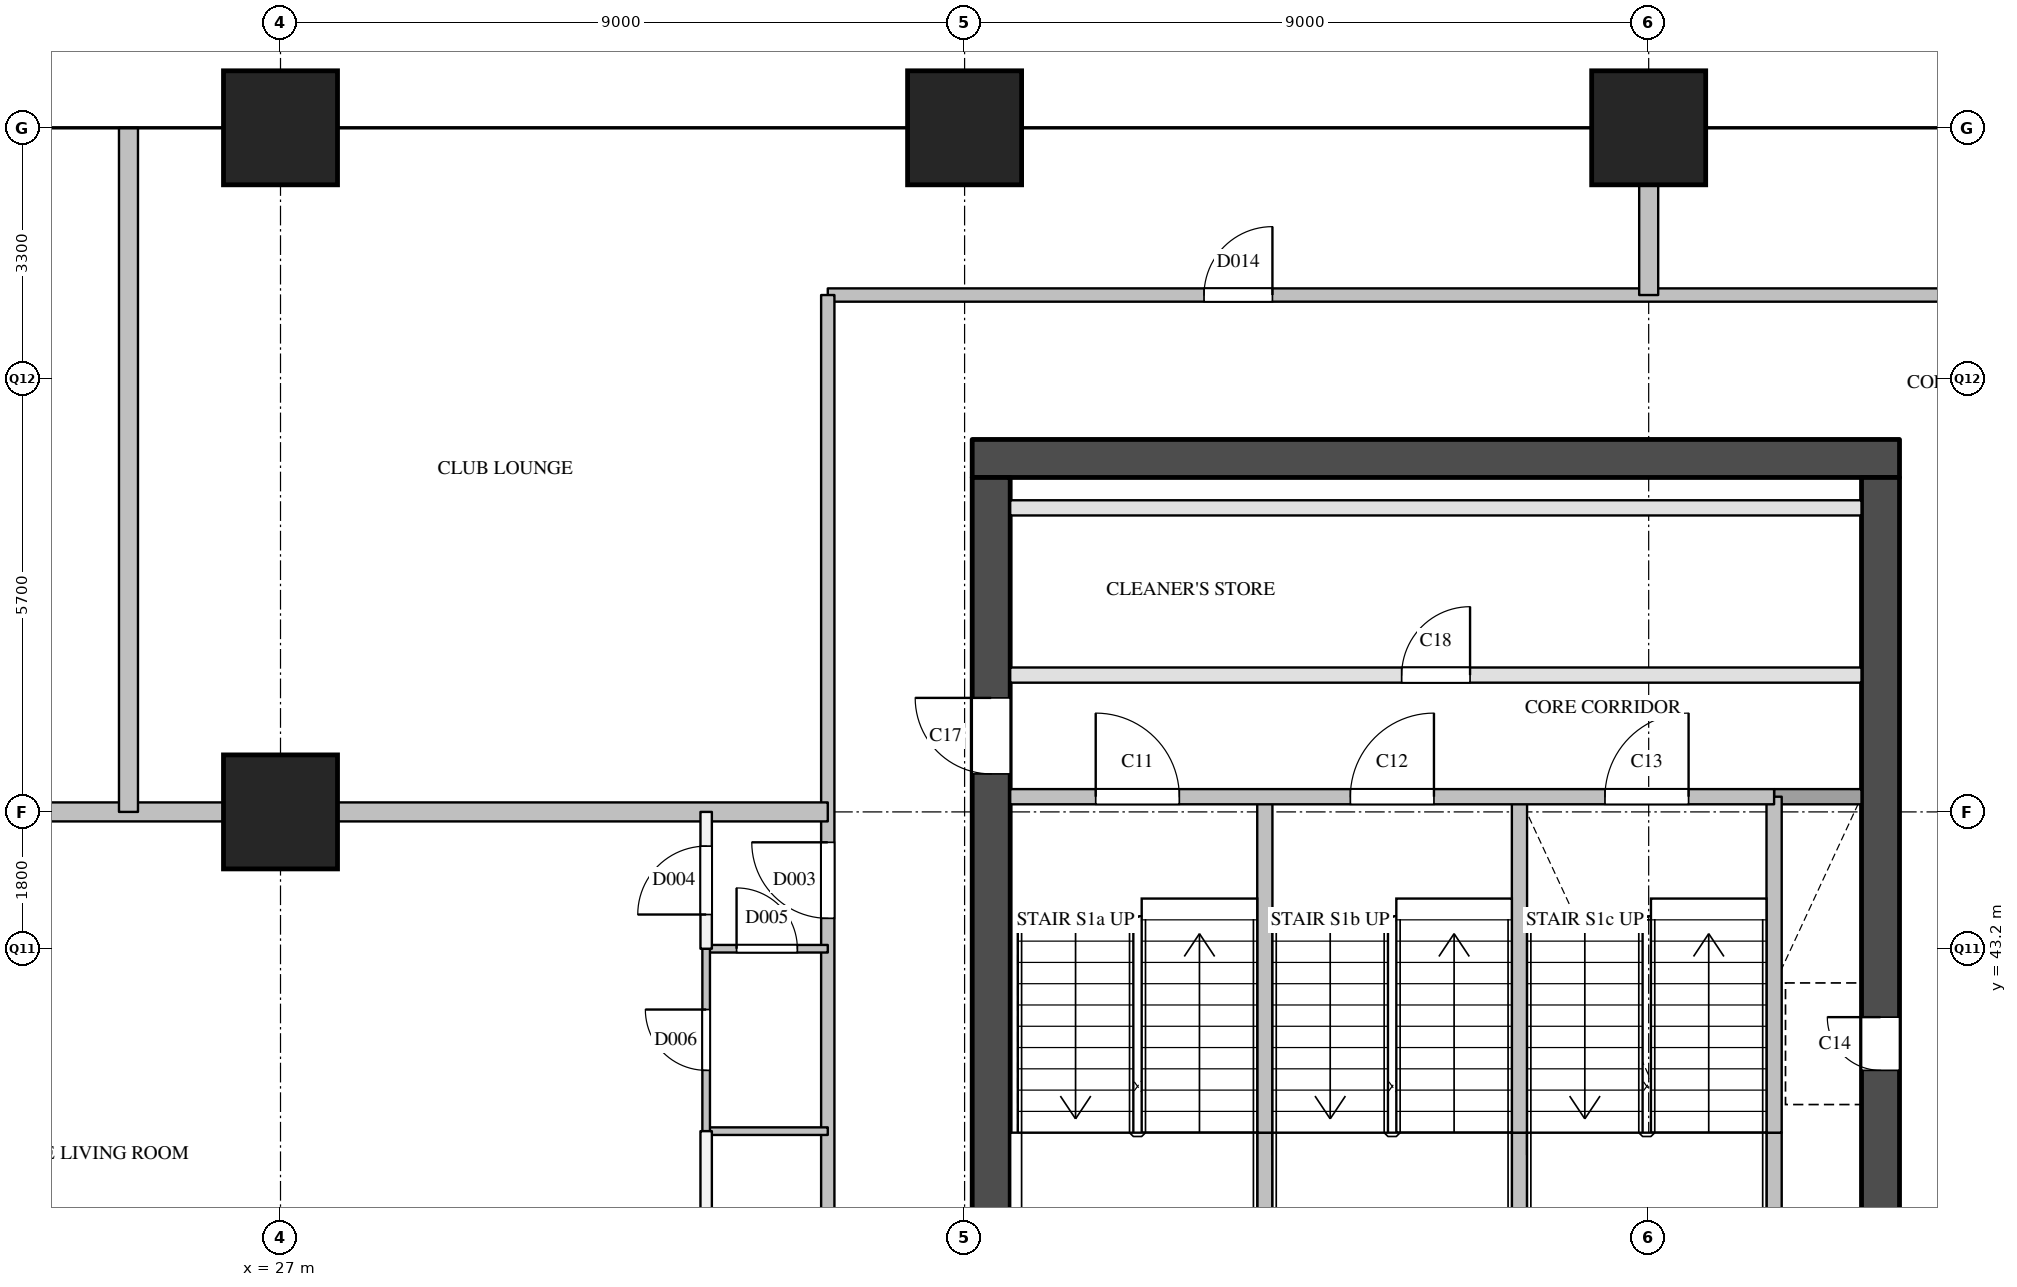
"""IFC4 building model, lengths in metres.
Left out: names, types, materials, properties, quantities, classifications, styles, units other than length and angle.
Written with IfcOpenShell. Run it as: python <this file> out.ifc"""

import sys

from ifc_helpers import new_model, si_unit, direction, frame, frame_2d, origin, origin_2d, place, context, subcontext, project, spatial, rectangle, extrude, element, fill, save


model = new_model("IFC4")
c1 = context("Model", 3, precision=1e-05, world=origin(), true_north=direction((0.0, 1.0)))
c2 = subcontext(c1, "Body", "Model", "MODEL_VIEW")
j1 = project(units=[si_unit("LENGTHUNIT", "METRE"), si_unit("PLANEANGLEUNIT", "RADIAN")], contexts=[c1])
p1 = place(None, origin())
s1 = spatial("IfcSite", under=j1, at=p1, CompositionType="ELEMENT")
p2 = place(p1, origin())
s2 = spatial("IfcBuilding", under=s1, at=p2, CompositionType="ELEMENT")
p3 = place(p2, frame((0.0, 0.0, 170.0)))
s3 = spatial("IfcBuildingStorey", under=s2, at=p3, CompositionType="ELEMENT", Elevation=170.0)
for number, where, z_axis, x_axis in (
    (1, (27.0, 45.0, 0.0), (0.0, 0.0, 1.0), (1.0, 0.0, 0.0)),
    (2, (27.0, 54.0, 0.0), (0.0, 0.0, 1.0), (1.0, 0.0, 0.0)),
    (3, (36.0, 54.0, 0.0), (0.0, 0.0, 1.0), (1.0, 0.0, 0.0)),
    (4, (45.0, 54.0, 0.0), (0.0, 0.0, 1.0), (1.0, 0.0, 0.0)),
):
    element("IfcColumn", number, at=place(p3, frame(where, z_axis=z_axis, x_axis=x_axis)), inside=s3, PredefinedType="COLUMN", context=c2, shape_type="SweptSolid", body=[
        extrude(rectangle(XDim=1.5, YDim=1.5, at=origin_2d()), origin(), (0.0, 0.0, 1.0), 3.9),
    ])
p4 = place(p3, frame((36.1, 49.65, 0.0), z_axis=(0.0, 0.0, 1.0), x_axis=(1.0, 0.0, 0.0)))
e5 = element("IfcWall", 5, at=p4, inside=s3, PredefinedType="SHEAR", context=c2, shape_type="SweptSolid", body=[
    extrude(rectangle(XDim=12.2, YDim=0.5, at=frame_2d((6.1, 0.0))), origin(), (0.0, 0.0, 1.0), 3.6),
])
p5 = place(p3, frame((36.35, 29.1, 0.0), z_axis=(0.0, 0.0, 1.0), x_axis=(0.0, 1.0, 0.0)))
e6 = element("IfcWall", 6, at=p5, inside=s3, PredefinedType="SHEAR", context=c2, shape_type="SweptSolid", body=[
    extrude(rectangle(XDim=20.3, YDim=0.5, at=frame_2d((10.15, 0.0))), origin(), (0.0, 0.0, 1.0), 3.6),
])
p6 = place(p5, frame((3.6, 0.0, 0.0)))
e7 = element("IfcOpeningElement", 7, at=p6, cuts=e6, PredefinedType="OPENING", context=c2, shape_type="SweptSolid", body=[
    extrude(rectangle(XDim=1.8, YDim=2.1, at=frame_2d((0.9, 1.05))), frame((0.0, 0.26, 0.0), z_axis=(0.0, -1.0, 0.0), x_axis=(1.0, 0.0, 0.0)), (0.0, 0.0, 1.0), 0.52),
])
p7 = place(p5, frame((16.4, 0.0, 0.0)))
e8 = element("IfcOpeningElement", 8, at=p7, cuts=e6, PredefinedType="OPENING", context=c2, shape_type="SweptSolid", body=[
    extrude(rectangle(XDim=1.0, YDim=2.1, at=frame_2d((0.5, 1.05))), frame((0.0, 0.26, 0.0), z_axis=(0.0, -1.0, 0.0), x_axis=(1.0, 0.0, 0.0)), (0.0, 0.0, 1.0), 0.52),
])
p8 = place(p3, frame((48.05, 29.1, 0.0), z_axis=(0.0, 0.0, 1.0), x_axis=(0.0, 1.0, 0.0)))
e9 = element("IfcWall", 9, at=p8, inside=s3, PredefinedType="SHEAR", context=c2, shape_type="SweptSolid", body=[
    extrude(rectangle(XDim=20.3, YDim=0.5, at=frame_2d((10.15, 0.0))), origin(), (0.0, 0.0, 1.0), 3.6),
])
p9 = place(p8, frame((12.5, 0.0, 0.0)))
e10 = element("IfcOpeningElement", 10, at=p9, cuts=e9, PredefinedType="OPENING", context=c2, shape_type="SweptSolid", body=[
    extrude(rectangle(XDim=0.7, YDim=2.1, at=frame_2d((0.35, 1.05))), frame((0.0, 0.26, 0.0), z_axis=(0.0, -1.0, 0.0), x_axis=(1.0, 0.0, 0.0)), (0.0, 0.0, 1.0), 0.52),
])
p10 = place(p8, frame((3.9, 0.0, 0.0)))
e11 = element("IfcOpeningElement", 11, at=p10, cuts=e9, PredefinedType="OPENING", context=c2, shape_type="SweptSolid", body=[
    extrude(rectangle(XDim=1.8, YDim=2.1, at=frame_2d((0.9, 1.05))), frame((0.0, 0.26, 0.0), z_axis=(0.0, -1.0, 0.0), x_axis=(1.0, 0.0, 0.0)), (0.0, 0.0, 1.0), 0.52),
])
p11 = place(p3, frame((39.95, 39.0, 0.0), z_axis=(0.0, 0.0, 1.0), x_axis=(0.0, 1.0, 0.0)))
e12 = element("IfcWall", 12, at=p11, inside=s3, PredefinedType="SOLIDWALL", context=c2, shape_type="SweptSolid", body=[
    extrude(rectangle(XDim=1.78, YDim=0.2, at=frame_2d((0.89, 0.0))), origin(), (0.0, 0.0, 1.0), 3.6),
])
p12 = place(p3, frame((39.95, 40.78, 0.0), z_axis=(0.0, 0.0, 1.0), x_axis=(0.0, 1.0, 0.0)))
e13 = element("IfcWall", 13, at=p12, inside=s3, PredefinedType="SOLIDWALL", context=c2, shape_type="SweptSolid", body=[
    extrude(rectangle(XDim=4.42, YDim=0.2, at=frame_2d((2.21, 0.0))), origin(), (0.0, 0.0, 1.0), 3.6),
])
p13 = place(p3, frame((43.3, 39.0, 0.0), z_axis=(0.0, 0.0, 1.0), x_axis=(0.0, 1.0, 0.0)))
e14 = element("IfcWall", 14, at=p13, inside=s3, PredefinedType="SOLIDWALL", context=c2, shape_type="SweptSolid", body=[
    extrude(rectangle(XDim=1.78, YDim=0.2, at=frame_2d((0.89, 0.0))), origin(), (0.0, 0.0, 1.0), 3.6),
])
p14 = place(p3, frame((43.3, 40.78, 0.0), z_axis=(0.0, 0.0, 1.0), x_axis=(0.0, 1.0, 0.0)))
e15 = element("IfcWall", 15, at=p14, inside=s3, PredefinedType="SOLIDWALL", context=c2, shape_type="SweptSolid", body=[
    extrude(rectangle(XDim=4.42, YDim=0.2, at=frame_2d((2.21, 0.0))), origin(), (0.0, 0.0, 1.0), 3.6),
])
p15 = place(p3, frame((46.65, 39.0, 0.0), z_axis=(0.0, 0.0, 1.0), x_axis=(0.0, 1.0, 0.0)))
e16 = element("IfcWall", 16, at=p15, inside=s3, PredefinedType="SOLIDWALL", context=c2, shape_type="SweptSolid", body=[
    extrude(rectangle(XDim=1.78, YDim=0.2, at=frame_2d((0.89, 0.0))), origin(), (0.0, 0.0, 1.0), 3.6),
])
p16 = place(p3, frame((46.65, 40.78, 0.0), z_axis=(0.0, 0.0, 1.0), x_axis=(0.0, 1.0, 0.0)))
e17 = element("IfcWall", 17, at=p16, inside=s3, PredefinedType="SOLIDWALL", context=c2, shape_type="SweptSolid", body=[
    extrude(rectangle(XDim=4.42, YDim=0.2, at=frame_2d((2.21, 0.0))), origin(), (0.0, 0.0, 1.0), 3.6),
])
p17 = place(p3, frame((46.65, 45.2, 0.0), z_axis=(0.0, 0.0, 1.0), x_axis=(1.0, 0.0, 0.0)))
e18 = element("IfcWall", 18, at=p17, inside=s3, PredefinedType="SOLIDWALL", context=c2, shape_type="SweptSolid", body=[
    extrude(rectangle(XDim=1.15, YDim=0.2, at=frame_2d((0.575, 0.0))), origin(), (0.0, 0.0, 1.0), 3.6),
])
p18 = place(p3, frame((36.6, 45.2, 0.0), z_axis=(0.0, 0.0, 1.0), x_axis=(1.0, 0.0, 0.0)))
e19 = element("IfcWall", 19, at=p18, inside=s3, PredefinedType="SOLIDWALL", context=c2, shape_type="SweptSolid", body=[
    extrude(rectangle(XDim=10.05, YDim=0.2, at=frame_2d((5.025, 0.0))), origin(), (0.0, 0.0, 1.0), 3.6),
])
p19 = place(p18, frame((1.125, 0.0, 0.0)))
e20 = element("IfcOpeningElement", 20, at=p19, cuts=e19, PredefinedType="OPENING", context=c2, shape_type="SweptSolid", body=[
    extrude(rectangle(XDim=1.1, YDim=2.1, at=frame_2d((0.55, 1.05))), frame((0.0, 0.11, 0.0), z_axis=(0.0, -1.0, 0.0), x_axis=(1.0, 0.0, 0.0)), (0.0, 0.0, 1.0), 0.22),
])
p20 = place(p18, frame((4.475, 0.0, 0.0)))
e21 = element("IfcOpeningElement", 21, at=p20, cuts=e19, PredefinedType="OPENING", context=c2, shape_type="SweptSolid", body=[
    extrude(rectangle(XDim=1.1, YDim=2.1, at=frame_2d((0.55, 1.05))), frame((0.0, 0.11, 0.0), z_axis=(0.0, -1.0, 0.0), x_axis=(1.0, 0.0, 0.0)), (0.0, 0.0, 1.0), 0.22),
])
p21 = place(p18, frame((7.825, 0.0, 0.0)))
e22 = element("IfcOpeningElement", 22, at=p21, cuts=e19, PredefinedType="OPENING", context=c2, shape_type="SweptSolid", body=[
    extrude(rectangle(XDim=1.1, YDim=2.1, at=frame_2d((0.55, 1.05))), frame((0.0, 0.11, 0.0), z_axis=(0.0, -1.0, 0.0), x_axis=(1.0, 0.0, 0.0)), (0.0, 0.0, 1.0), 0.22),
])
p22 = place(p3, frame((36.6, 46.8, 0.0), z_axis=(0.0, 0.0, 1.0), x_axis=(1.0, 0.0, 0.0)))
e23 = element("IfcWall", 23, at=p22, inside=s3, PredefinedType="PARTITIONING", context=c2, shape_type="SweptSolid", body=[
    extrude(rectangle(XDim=11.2, YDim=0.2, at=frame_2d((5.6, 0.0))), origin(), (0.0, 0.0, 1.0), 3.6),
])
p23 = place(p22, frame((5.15, 0.0, 0.0)))
e24 = element("IfcOpeningElement", 24, at=p23, cuts=e23, PredefinedType="OPENING", context=c2, shape_type="SweptSolid", body=[
    extrude(rectangle(XDim=0.9, YDim=2.1, at=frame_2d((0.45, 1.05))), frame((0.0, 0.11, 0.0), z_axis=(0.0, -1.0, 0.0), x_axis=(1.0, 0.0, 0.0)), (0.0, 0.0, 1.0), 0.22),
])
p24 = place(p3, frame((36.6, 49.0, 0.0), z_axis=(0.0, 0.0, 1.0), x_axis=(1.0, 0.0, 0.0)))
e25 = element("IfcWall", 25, at=p24, inside=s3, PredefinedType="PARTITIONING", context=c2, shape_type="SweptSolid", body=[
    extrude(rectangle(XDim=11.2, YDim=0.2, at=frame_2d((5.6, 0.0))), origin(), (0.0, 0.0, 1.0), 3.6),
])
p25 = place(p3, frame((34.2, 51.8, 0.0), z_axis=(0.0, 0.0, 1.0), x_axis=(1.0, 0.0, 0.0)))
e26 = element("IfcWall", 26, at=p25, inside=s3, PredefinedType="PARTITIONING", context=c2, shape_type="SweptSolid", body=[
    extrude(rectangle(XDim=16.0, YDim=0.175, at=frame_2d((8.0, 0.0))), origin(), (0.0, 0.0, 1.0), 3.6),
])
p26 = place(p25, frame((4.95, 0.0, 0.0)))
e27 = element("IfcOpeningElement", 27, at=p26, cuts=e26, PredefinedType="OPENING", context=c2, shape_type="SweptSolid", body=[
    extrude(rectangle(XDim=0.9, YDim=2.1, at=frame_2d((0.45, 1.05))), frame((0.0, 0.097, 0.0), z_axis=(0.0, -1.0, 0.0), x_axis=(1.0, 0.0, 0.0)), (0.0, 0.0, 1.0), 0.195),
])
p27 = place(p3, frame((34.2, 28.5, 0.0), z_axis=(0.0, 0.0, 1.0), x_axis=(0.0, 1.0, 0.0)))
e28 = element("IfcWall", 28, at=p27, inside=s3, PredefinedType="PARTITIONING", context=c2, shape_type="SweptSolid", body=[
    extrude(rectangle(XDim=23.3, YDim=0.175, at=frame_2d((11.65, 0.0))), origin(), (0.0, 0.0, 1.0), 3.6),
])
p28 = place(p27, frame((15.1, 0.0, 0.0)))
e29 = element("IfcOpeningElement", 29, at=p28, cuts=e28, PredefinedType="OPENING", context=c2, shape_type="SweptSolid", body=[
    extrude(rectangle(XDim=1.0, YDim=2.1, at=frame_2d((0.5, 1.05))), frame((0.0, 0.097, 0.0), z_axis=(0.0, -1.0, 0.0), x_axis=(1.0, 0.0, 0.0)), (0.0, 0.0, 1.0), 0.195),
])
p29 = place(p3, frame((32.6, 27.0, 0.0), z_axis=(0.0, 0.0, 1.0), x_axis=(0.0, 1.0, 0.0)))
e30 = element("IfcWall", 30, at=p29, inside=s3, PredefinedType="PARTITIONING", context=c2, shape_type="SweptSolid", body=[
    extrude(rectangle(XDim=13.8, YDim=0.15, at=frame_2d((6.9, 0.0))), origin(), (0.0, 0.0, 1.0), 2.6),
])
p30 = place(p29, frame((10.45, 0.0, 0.0)))
e31 = element("IfcOpeningElement", 31, at=p30, cuts=e30, PredefinedType="OPENING", context=c2, shape_type="SweptSolid", body=[
    extrude(rectangle(XDim=0.9, YDim=2.1, at=frame_2d((0.45, 1.05))), frame((0.0, 0.085, 0.0), z_axis=(0.0, -1.0, 0.0), x_axis=(1.0, 0.0, 0.0)), (0.0, 0.0, 1.0), 0.17),
])
p31 = place(p3, frame((32.6, 43.2, 0.0), z_axis=(0.0, 0.0, 1.0), x_axis=(0.0, 1.0, 0.0)))
e32 = element("IfcWall", 32, at=p31, inside=s3, PredefinedType="PARTITIONING", context=c2, shape_type="SweptSolid", body=[
    extrude(rectangle(XDim=1.8, YDim=0.15, at=frame_2d((0.9, 0.0))), origin(), (0.0, 0.0, 1.0), 3.6),
])
p32 = place(p31, frame((0.45, 0.0, 0.0)))
e33 = element("IfcOpeningElement", 33, at=p32, cuts=e32, PredefinedType="OPENING", context=c2, shape_type="SweptSolid", body=[
    extrude(rectangle(XDim=0.9, YDim=2.1, at=frame_2d((0.45, 1.05))), frame((0.0, 0.085, 0.0), z_axis=(0.0, -1.0, 0.0), x_axis=(1.0, 0.0, 0.0)), (0.0, 0.0, 1.0), 0.17),
])
p33 = place(p3, frame((19.8, 45.0, 0.0), z_axis=(0.0, 0.0, 1.0), x_axis=(1.0, 0.0, 0.0)))
e34 = element("IfcWall", 34, at=p33, inside=s3, PredefinedType="PARTITIONING", context=c2, shape_type="SweptSolid", body=[
    extrude(rectangle(XDim=14.4, YDim=0.25, at=frame_2d((7.2, 0.0))), origin(), (0.0, 0.0, 1.0), 3.6),
])
p34 = place(p3, frame((25.0, 45.0, 0.0), z_axis=(0.0, 0.0, 1.0), x_axis=(0.0, 1.0, 0.0)))
e35 = element("IfcWall", 35, at=p34, inside=s3, PredefinedType="PARTITIONING", context=c2, shape_type="SweptSolid", body=[
    extrude(rectangle(XDim=9.0, YDim=0.25, at=frame_2d((4.5, 0.0))), origin(), (0.0, 0.0, 1.0), 2.6),
])
p35 = place(p3, frame((45.0, 51.8, 0.0), z_axis=(0.0, 0.0, 1.0), x_axis=(0.0, 1.0, 0.0)))
e36 = element("IfcWall", 36, at=p35, inside=s3, PredefinedType="PARTITIONING", context=c2, shape_type="SweptSolid", body=[
    extrude(rectangle(XDim=2.2, YDim=0.25, at=frame_2d((1.1, 0.0))), origin(), (0.0, 0.0, 1.0), 3.6),
])
p36 = place(p3, frame((32.6, 40.8, 0.0), z_axis=(0.0, 0.0, 1.0), x_axis=(1.0, 0.0, 0.0)))
e37 = element("IfcWall", 37, at=p36, inside=s3, PredefinedType="PARTITIONING", context=c2, shape_type="SweptSolid", body=[
    extrude(rectangle(XDim=1.6, YDim=0.1, at=frame_2d((0.8, 0.0))), origin(), (0.0, 0.0, 1.0), 3.6),
])
p37 = place(p3, frame((32.6, 43.2, 0.0), z_axis=(0.0, 0.0, 1.0), x_axis=(1.0, 0.0, 0.0)))
e38 = element("IfcWall", 38, at=p37, inside=s3, PredefinedType="PARTITIONING", context=c2, shape_type="SweptSolid", body=[
    extrude(rectangle(XDim=1.6, YDim=0.1, at=frame_2d((0.8, 0.0))), origin(), (0.0, 0.0, 1.0), 3.6),
])
p38 = place(p37, frame((0.4, 0.0, 0.0)))
e39 = element("IfcOpeningElement", 39, at=p38, cuts=e38, PredefinedType="OPENING", context=c2, shape_type="SweptSolid", body=[
    extrude(rectangle(XDim=0.8, YDim=2.1, at=frame_2d((0.4, 1.05))), frame((0.0, 0.06, 0.0), z_axis=(0.0, -1.0, 0.0), x_axis=(1.0, 0.0, 0.0)), (0.0, 0.0, 1.0), 0.12),
])
p39 = place(p3, frame((32.6, 40.8, 0.0), z_axis=(0.0, 0.0, 1.0), x_axis=(0.0, 1.0, 0.0)))
e40 = element("IfcWall", 40, at=p39, inside=s3, PredefinedType="PARTITIONING", context=c2, shape_type="SweptSolid", body=[
    extrude(rectangle(XDim=2.4, YDim=0.1, at=frame_2d((1.2, 0.0))), origin(), (0.0, 0.0, 1.0), 3.6),
])
p40 = place(p39, frame((0.8, 0.0, 0.0)))
e41 = element("IfcOpeningElement", 41, at=p40, cuts=e40, PredefinedType="OPENING", context=c2, shape_type="SweptSolid", body=[
    extrude(rectangle(XDim=0.8, YDim=2.1, at=frame_2d((0.4, 1.05))), frame((0.0, 0.06, 0.0), z_axis=(0.0, -1.0, 0.0), x_axis=(1.0, 0.0, 0.0)), (0.0, 0.0, 1.0), 0.12),
])
p41 = place(p19, origin())
e42 = element("IfcDoor", 42, at=p41, inside=s3, OperationType="SINGLE_SWING_LEFT", PredefinedType="DOOR", context=c2, shape_type="SweptSolid", body=[
    extrude(rectangle(XDim=1.1, YDim=2.1, at=frame_2d((0.55, 1.05))), frame((0.0, 0.025, 0.0), z_axis=(0.0, -1.0, 0.0), x_axis=(1.0, 0.0, 0.0)), (0.0, 0.0, 1.0), 0.05),
])
fill(e20, e42)
p42 = place(p20, origin())
e43 = element("IfcDoor", 43, at=p42, inside=s3, OperationType="SINGLE_SWING_RIGHT", PredefinedType="DOOR", context=c2, shape_type="SweptSolid", body=[
    extrude(rectangle(XDim=1.1, YDim=2.1, at=frame_2d((0.55, 1.05))), frame((0.0, 0.025, 0.0), z_axis=(0.0, -1.0, 0.0), x_axis=(1.0, 0.0, 0.0)), (0.0, 0.0, 1.0), 0.05),
])
fill(e21, e43)
p43 = place(p21, origin())
e44 = element("IfcDoor", 44, at=p43, inside=s3, OperationType="SINGLE_SWING_RIGHT", PredefinedType="DOOR", context=c2, shape_type="SweptSolid", body=[
    extrude(rectangle(XDim=1.1, YDim=2.1, at=frame_2d((0.55, 1.05))), frame((0.0, 0.025, 0.0), z_axis=(0.0, -1.0, 0.0), x_axis=(1.0, 0.0, 0.0)), (0.0, 0.0, 1.0), 0.05),
])
fill(e22, e44)
p44 = place(p9, origin())
e45 = element("IfcDoor", 45, at=p44, inside=s3, OperationType="SINGLE_SWING_RIGHT", PredefinedType="DOOR", context=c2, shape_type="SweptSolid", body=[
    extrude(rectangle(XDim=0.7, YDim=2.1, at=frame_2d((0.35, 1.05))), frame((0.0, 0.025, 0.0), z_axis=(0.0, -1.0, 0.0), x_axis=(1.0, 0.0, 0.0)), (0.0, 0.0, 1.0), 0.05),
])
fill(e10, e45)
p45 = place(p7, origin())
e46 = element("IfcDoor", 46, at=p45, inside=s3, OperationType="SINGLE_SWING_RIGHT", PredefinedType="DOOR", context=c2, shape_type="SweptSolid", body=[
    extrude(rectangle(XDim=1.0, YDim=2.1, at=frame_2d((0.5, 1.05))), frame((0.0, 0.025, 0.0), z_axis=(0.0, -1.0, 0.0), x_axis=(1.0, 0.0, 0.0)), (0.0, 0.0, 1.0), 0.05),
])
fill(e8, e46)
p46 = place(p23, origin())
e47 = element("IfcDoor", 47, at=p46, inside=s3, OperationType="SINGLE_SWING_RIGHT", PredefinedType="DOOR", context=c2, shape_type="SweptSolid", body=[
    extrude(rectangle(XDim=0.9, YDim=2.1, at=frame_2d((0.45, 1.05))), frame((0.0, 0.025, 0.0), z_axis=(0.0, -1.0, 0.0), x_axis=(1.0, 0.0, 0.0)), (0.0, 0.0, 1.0), 0.05),
])
fill(e24, e47)
p47 = place(p28, origin())
e48 = element("IfcDoor", 48, at=p47, inside=s3, OperationType="SINGLE_SWING_RIGHT", PredefinedType="DOOR", context=c2, shape_type="SweptSolid", body=[
    extrude(rectangle(XDim=1.0, YDim=2.1, at=frame_2d((0.5, 1.05))), frame((0.0, 0.025, 0.0), z_axis=(0.0, -1.0, 0.0), x_axis=(1.0, 0.0, 0.0)), (0.0, 0.0, 1.0), 0.05),
])
fill(e29, e48)
p48 = place(p32, origin())
e49 = element("IfcDoor", 49, at=p48, inside=s3, OperationType="SINGLE_SWING_LEFT", PredefinedType="DOOR", context=c2, shape_type="SweptSolid", body=[
    extrude(rectangle(XDim=0.9, YDim=2.1, at=frame_2d((0.45, 1.05))), frame((0.0, 0.025, 0.0), z_axis=(0.0, -1.0, 0.0), x_axis=(1.0, 0.0, 0.0)), (0.0, 0.0, 1.0), 0.05),
])
fill(e33, e49)
p49 = place(p38, origin())
e50 = element("IfcDoor", 50, at=p49, inside=s3, OperationType="SINGLE_SWING_LEFT", PredefinedType="DOOR", context=c2, shape_type="SweptSolid", body=[
    extrude(rectangle(XDim=0.8, YDim=2.1, at=frame_2d((0.4, 1.05))), frame((0.0, 0.025, 0.0), z_axis=(0.0, -1.0, 0.0), x_axis=(1.0, 0.0, 0.0)), (0.0, 0.0, 1.0), 0.05),
])
fill(e39, e50)
p50 = place(p40, origin())
e51 = element("IfcDoor", 51, at=p50, inside=s3, OperationType="SINGLE_SWING_RIGHT", PredefinedType="DOOR", context=c2, shape_type="SweptSolid", body=[
    extrude(rectangle(XDim=0.8, YDim=2.1, at=frame_2d((0.4, 1.05))), frame((0.0, 0.025, 0.0), z_axis=(0.0, -1.0, 0.0), x_axis=(1.0, 0.0, 0.0)), (0.0, 0.0, 1.0), 0.05),
])
fill(e41, e51)
p51 = place(p26, origin())
e52 = element("IfcDoor", 52, at=p51, inside=s3, OperationType="SINGLE_SWING_RIGHT", PredefinedType="DOOR", context=c2, shape_type="SweptSolid", body=[
    extrude(rectangle(XDim=0.9, YDim=2.1, at=frame_2d((0.45, 1.05))), frame((0.0, 0.025, 0.0), z_axis=(0.0, -1.0, 0.0), x_axis=(1.0, 0.0, 0.0)), (0.0, 0.0, 1.0), 0.05),
])
fill(e27, e52)
save(model, sys.argv[1])
